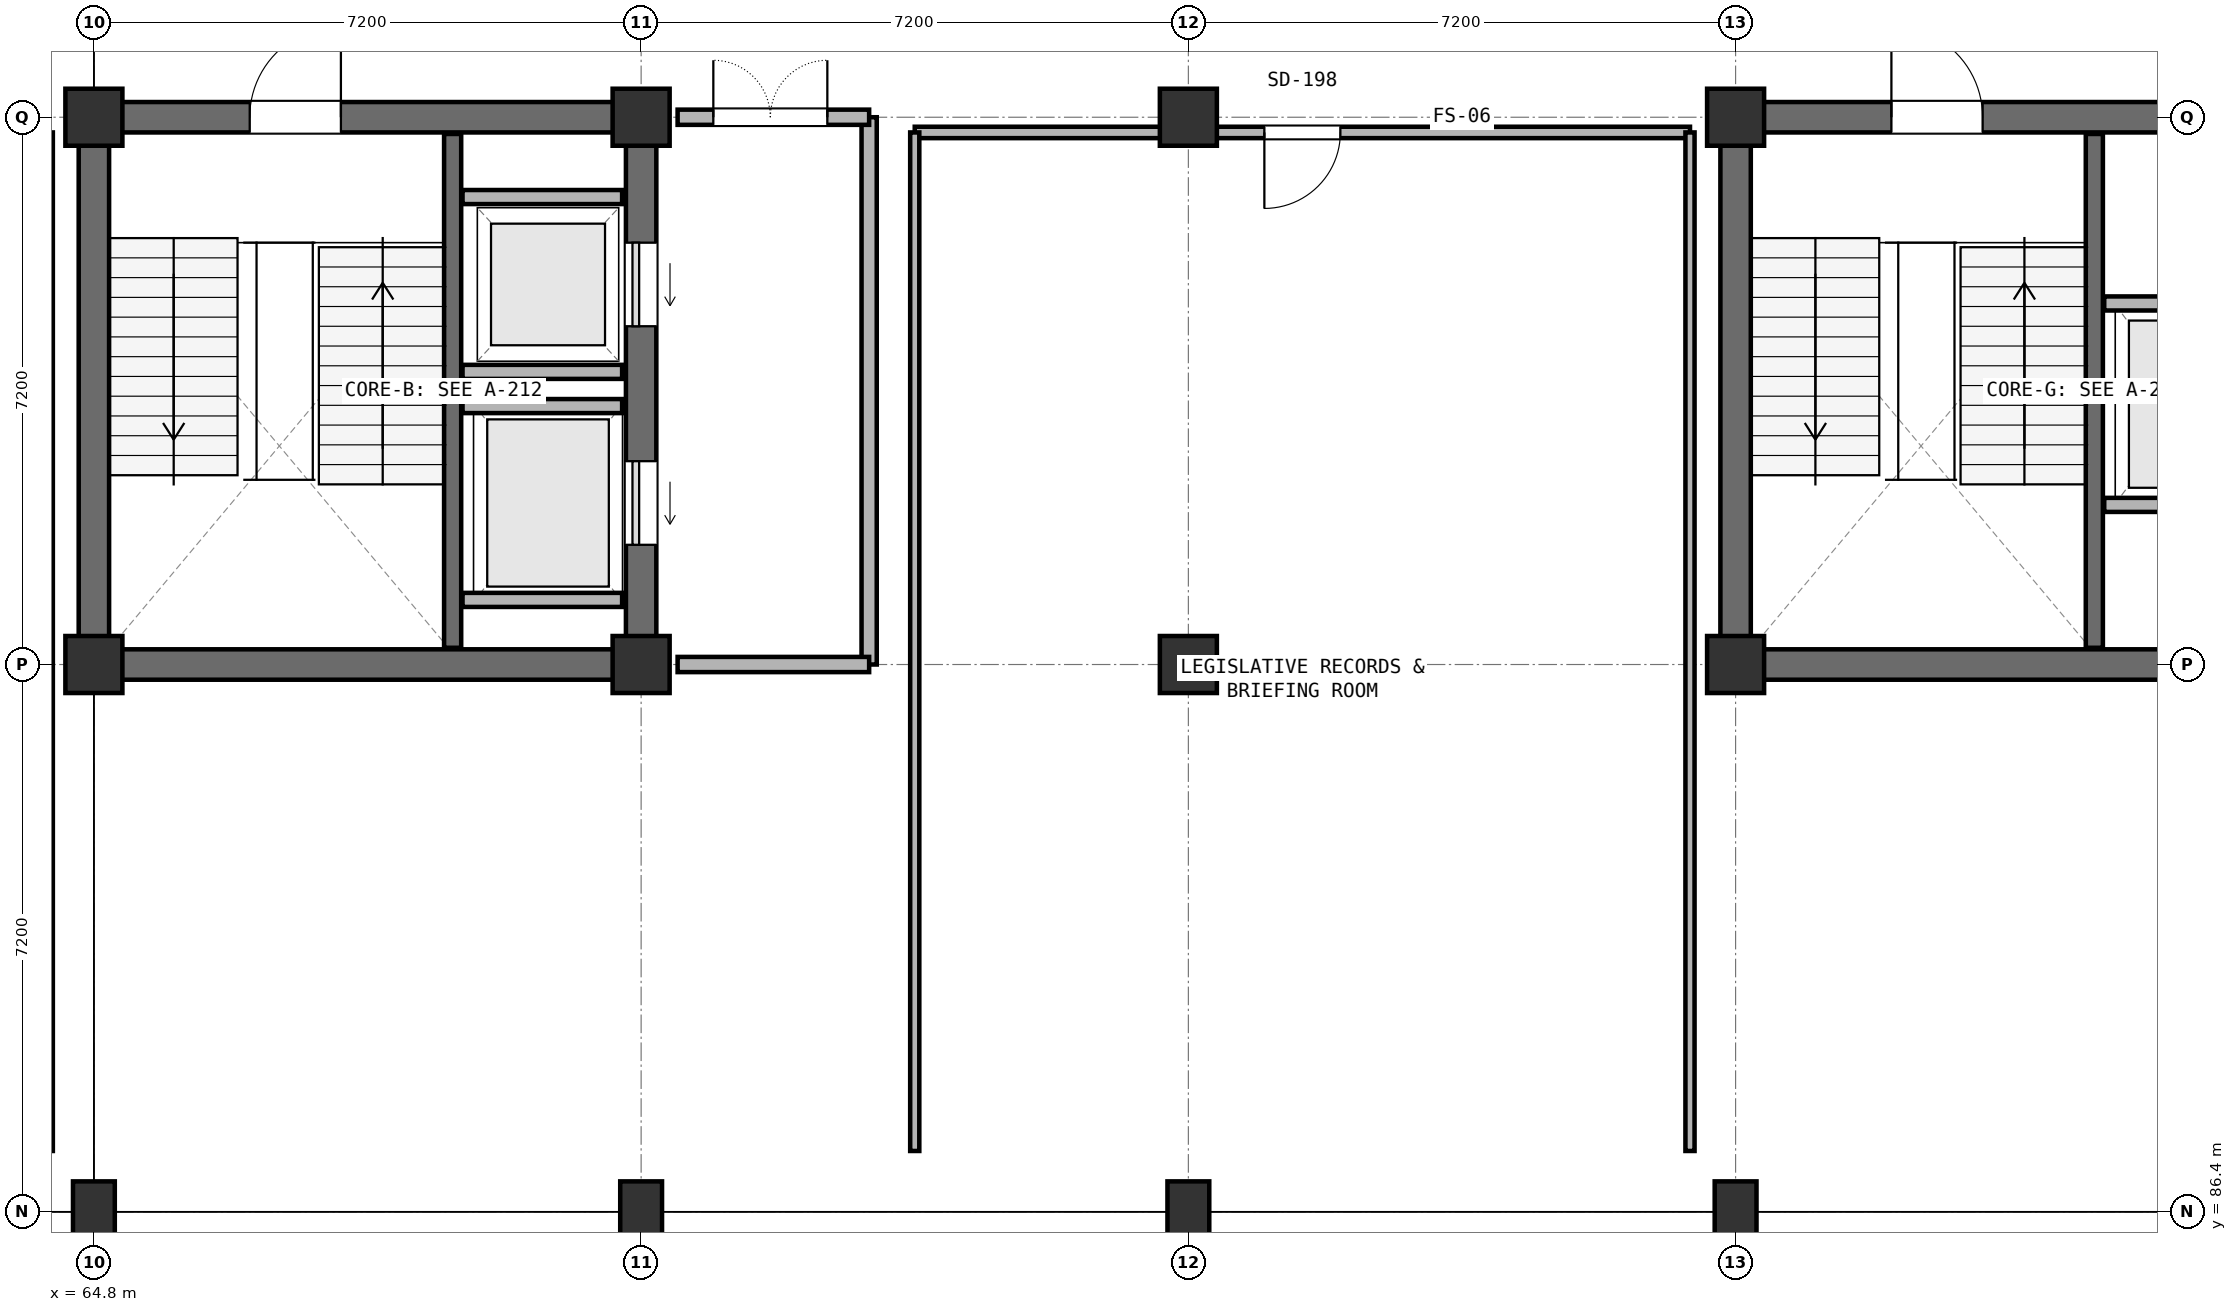
"""IFC4 building model, lengths in metres.
Left out: names, types, materials, properties, quantities, classifications, styles, units other than length and angle.
Written with IfcOpenShell. Run it as: python <this file> out.ifc"""

import sys

from ifc_helpers import new_model, si_unit, direction, frame, frame_2d, origin, origin_2d, place, context, subcontext, project, spatial, rectangle, extrude, element, fill, save


model = new_model("IFC4")
c1 = context("Model", 3, precision=1e-05, world=origin(), true_north=direction((0.0, 1.0)))
c2 = subcontext(c1, "Body", "Model", "MODEL_VIEW")
j1 = project(units=[si_unit("LENGTHUNIT", "METRE"), si_unit("PLANEANGLEUNIT", "RADIAN")], contexts=[c1])
p1 = place(None, origin())
s1 = spatial("IfcSite", under=j1, at=p1, CompositionType="ELEMENT")
p2 = place(p1, origin())
s2 = spatial("IfcBuilding", under=s1, at=p2, CompositionType="ELEMENT")
p3 = place(p2, frame((0.0, 0.0, 10.2)))
s3 = spatial("IfcBuildingStorey", under=s2, at=p3, CompositionType="ELEMENT", Elevation=10.2)
p4 = place(p3, frame((64.8, 86.4, 0.0), z_axis=(0.0, 0.0, 1.0), x_axis=(1.0, 0.0, 0.0)))
e1 = element("IfcColumn", 1, at=p4, inside=s3, PredefinedType="COLUMN", context=c2, shape_type="SweptSolid", body=[
    extrude(rectangle(XDim=0.55, YDim=0.8, at=origin_2d()), origin(), (0.0, 0.0, 1.0), 4.2),
])
for number, where, z_axis, x_axis in (
    (2, (64.8, 93.6, 0.0), (0.0, 0.0, 1.0), (1.0, 0.0, 0.0)),
    (3, (64.8, 100.8, 0.0), (0.0, 0.0, 1.0), (1.0, 0.0, 0.0)),
):
    element("IfcColumn", number, at=place(p3, frame(where, z_axis=z_axis, x_axis=x_axis)), inside=s3, PredefinedType="COLUMN", context=c2, shape_type="SweptSolid", body=[
        extrude(rectangle(XDim=0.75, YDim=0.75, at=origin_2d()), origin(), (0.0, 0.0, 1.0), 4.2),
    ])
p5 = place(p3, frame((72.0, 86.4, 0.0), z_axis=(0.0, 0.0, 1.0), x_axis=(1.0, 0.0, 0.0)))
e4 = element("IfcColumn", 4, at=p5, inside=s3, PredefinedType="COLUMN", context=c2, shape_type="SweptSolid", body=[
    extrude(rectangle(XDim=0.55, YDim=0.8, at=origin_2d()), origin(), (0.0, 0.0, 1.0), 4.2),
])
for number, where, z_axis, x_axis in (
    (5, (72.0, 93.6, 0.0), (0.0, 0.0, 1.0), (1.0, 0.0, 0.0)),
    (6, (72.0, 100.8, 0.0), (0.0, 0.0, 1.0), (1.0, 0.0, 0.0)),
):
    element("IfcColumn", number, at=place(p3, frame(where, z_axis=z_axis, x_axis=x_axis)), inside=s3, PredefinedType="COLUMN", context=c2, shape_type="SweptSolid", body=[
        extrude(rectangle(XDim=0.75, YDim=0.75, at=origin_2d()), origin(), (0.0, 0.0, 1.0), 4.2),
    ])
p6 = place(p3, frame((79.2, 86.4, 0.0), z_axis=(0.0, 0.0, 1.0), x_axis=(1.0, 0.0, 0.0)))
e7 = element("IfcColumn", 7, at=p6, inside=s3, PredefinedType="COLUMN", context=c2, shape_type="SweptSolid", body=[
    extrude(rectangle(XDim=0.55, YDim=0.8, at=origin_2d()), origin(), (0.0, 0.0, 1.0), 4.2),
])
for number, where, z_axis, x_axis in (
    (8, (79.2, 93.6, 0.0), (0.0, 0.0, 1.0), (1.0, 0.0, 0.0)),
    (9, (79.2, 100.8, 0.0), (0.0, 0.0, 1.0), (1.0, 0.0, 0.0)),
):
    element("IfcColumn", number, at=place(p3, frame(where, z_axis=z_axis, x_axis=x_axis)), inside=s3, PredefinedType="COLUMN", context=c2, shape_type="SweptSolid", body=[
        extrude(rectangle(XDim=0.75, YDim=0.75, at=origin_2d()), origin(), (0.0, 0.0, 1.0), 4.2),
    ])
p7 = place(p3, frame((86.4, 86.4, 0.0), z_axis=(0.0, 0.0, 1.0), x_axis=(1.0, 0.0, 0.0)))
e10 = element("IfcColumn", 10, at=p7, inside=s3, PredefinedType="COLUMN", context=c2, shape_type="SweptSolid", body=[
    extrude(rectangle(XDim=0.55, YDim=0.8, at=origin_2d()), origin(), (0.0, 0.0, 1.0), 4.2),
])
for number, where, z_axis, x_axis in (
    (11, (86.4, 93.6, 0.0), (0.0, 0.0, 1.0), (1.0, 0.0, 0.0)),
    (12, (86.4, 100.8, 0.0), (0.0, 0.0, 1.0), (1.0, 0.0, 0.0)),
):
    element("IfcColumn", number, at=place(p3, frame(where, z_axis=z_axis, x_axis=x_axis)), inside=s3, PredefinedType="COLUMN", context=c2, shape_type="SweptSolid", body=[
        extrude(rectangle(XDim=0.75, YDim=0.75, at=origin_2d()), origin(), (0.0, 0.0, 1.0), 4.2),
    ])
p8 = place(p3, frame((65.15, 93.6, 0.0), z_axis=(0.0, 0.0, 1.0), x_axis=(1.0, 0.0, 0.0)))
e13 = element("IfcWall", 13, at=p8, inside=s3, PredefinedType="SHEAR", context=c2, shape_type="SweptSolid", body=[
    extrude(rectangle(XDim=6.5, YDim=0.4, at=frame_2d((3.25, 0.0))), origin(), (0.0, 0.0, 1.0), 4.2),
])
p9 = place(p3, frame((72.0, 93.95, 0.0), z_axis=(0.0, 0.0, 1.0), x_axis=(0.0, 1.0, 0.0)))
e14 = element("IfcWall", 14, at=p9, inside=s3, PredefinedType="SHEAR", context=c2, shape_type="SweptSolid", body=[
    extrude(rectangle(XDim=6.5, YDim=0.4, at=frame_2d((3.25, 0.0))), origin(), (0.0, 0.0, 1.0), 4.2),
])
p10 = place(p9, frame((1.225, 0.0, 0.0)))
e15 = element("IfcOpeningElement", 15, at=p10, cuts=e14, PredefinedType="OPENING", context=c2, shape_type="SweptSolid", body=[
    extrude(rectangle(XDim=1.1, YDim=2.2, at=frame_2d((0.55, 1.1))), frame((0.0, 0.21, 0.0), z_axis=(0.0, -1.0, 0.0), x_axis=(1.0, 0.0, 0.0)), (0.0, 0.0, 1.0), 0.42),
])
p11 = place(p9, frame((4.1, 0.0, 0.0)))
e16 = element("IfcOpeningElement", 16, at=p11, cuts=e14, PredefinedType="OPENING", context=c2, shape_type="SweptSolid", body=[
    extrude(rectangle(XDim=1.1, YDim=2.2, at=frame_2d((0.55, 1.1))), frame((0.0, 0.21, 0.0), z_axis=(0.0, -1.0, 0.0), x_axis=(1.0, 0.0, 0.0)), (0.0, 0.0, 1.0), 0.42),
])
p12 = place(p3, frame((71.65, 100.8, 0.0), z_axis=(0.0, 0.0, 1.0), x_axis=(-1.0, 0.0, 0.0)))
e17 = element("IfcWall", 17, at=p12, inside=s3, PredefinedType="SHEAR", context=c2, shape_type="SweptSolid", body=[
    extrude(rectangle(XDim=6.5, YDim=0.4, at=frame_2d((3.25, 0.0))), origin(), (0.0, 0.0, 1.0), 4.2),
])
p13 = place(p12, frame((3.6, 0.0, 0.0)))
e18 = element("IfcOpeningElement", 18, at=p13, cuts=e17, PredefinedType="OPENING", context=c2, shape_type="SweptSolid", body=[
    extrude(rectangle(XDim=1.2, YDim=2.2, at=frame_2d((0.6, 1.1))), frame((0.0, 0.21, 0.0), z_axis=(0.0, -1.0, 0.0), x_axis=(1.0, 0.0, 0.0)), (0.0, 0.0, 1.0), 0.42),
])
p14 = place(p3, frame((64.8, 100.45, 0.0), z_axis=(0.0, 0.0, 1.0), x_axis=(0.0, -1.0, 0.0)))
e19 = element("IfcWall", 19, at=p14, inside=s3, PredefinedType="SHEAR", context=c2, shape_type="SweptSolid", body=[
    extrude(rectangle(XDim=6.5, YDim=0.4, at=frame_2d((3.25, 0.0))), origin(), (0.0, 0.0, 1.0), 4.2),
])
p15 = place(p3, frame((69.52, 93.82, 0.0), z_axis=(0.0, 0.0, 1.0), x_axis=(0.0, 1.0, 0.0)))
e20 = element("IfcWall", 20, at=p15, inside=s3, PredefinedType="SHEAR", context=c2, shape_type="SweptSolid", body=[
    extrude(rectangle(XDim=6.76, YDim=0.225, at=frame_2d((3.38, 0.0))), origin(), (0.0, 0.0, 1.0), 4.2),
])
p16 = place(p3, frame((86.75, 93.6, 0.0), z_axis=(0.0, 0.0, 1.0), x_axis=(1.0, 0.0, 0.0)))
e21 = element("IfcWall", 21, at=p16, inside=s3, PredefinedType="SHEAR", context=c2, shape_type="SweptSolid", body=[
    extrude(rectangle(XDim=6.5, YDim=0.4, at=frame_2d((3.25, 0.0))), origin(), (0.0, 0.0, 1.0), 4.2),
])
p17 = place(p3, frame((93.25, 100.8, 0.0), z_axis=(0.0, 0.0, 1.0), x_axis=(-1.0, 0.0, 0.0)))
e22 = element("IfcWall", 22, at=p17, inside=s3, PredefinedType="SHEAR", context=c2, shape_type="SweptSolid", body=[
    extrude(rectangle(XDim=6.5, YDim=0.4, at=frame_2d((3.25, 0.0))), origin(), (0.0, 0.0, 1.0), 4.2),
])
p18 = place(p17, frame((3.6, 0.0, 0.0)))
e23 = element("IfcOpeningElement", 23, at=p18, cuts=e22, PredefinedType="OPENING", context=c2, shape_type="SweptSolid", body=[
    extrude(rectangle(XDim=1.2, YDim=2.2, at=frame_2d((0.6, 1.1))), frame((0.0, 0.21, 0.0), z_axis=(0.0, -1.0, 0.0), x_axis=(1.0, 0.0, 0.0)), (0.0, 0.0, 1.0), 0.42),
])
p19 = place(p3, frame((86.4, 100.45, 0.0), z_axis=(0.0, 0.0, 1.0), x_axis=(0.0, -1.0, 0.0)))
e24 = element("IfcWall", 24, at=p19, inside=s3, PredefinedType="SHEAR", context=c2, shape_type="SweptSolid", body=[
    extrude(rectangle(XDim=6.5, YDim=0.4, at=frame_2d((3.25, 0.0))), origin(), (0.0, 0.0, 1.0), 4.2),
])
p20 = place(p3, frame((91.12, 93.82, 0.0), z_axis=(0.0, 0.0, 1.0), x_axis=(0.0, 1.0, 0.0)))
e25 = element("IfcWall", 25, at=p20, inside=s3, PredefinedType="SHEAR", context=c2, shape_type="SweptSolid", body=[
    extrude(rectangle(XDim=6.76, YDim=0.225, at=frame_2d((3.38, 0.0))), origin(), (0.0, 0.0, 1.0), 4.2),
])
for number, where, z_axis, x_axis in (
    (26, (69.65, 94.45, 0.0), (0.0, 0.0, 1.0), (1.0, 0.0, 0.0)),
    (27, (69.65, 97.0, 0.0), (0.0, 0.0, 1.0), (1.0, 0.0, 0.0)),
    (28, (69.65, 97.45, 0.0), (0.0, 0.0, 1.0), (1.0, 0.0, 0.0)),
    (29, (69.65, 99.75, 0.0), (0.0, 0.0, 1.0), (1.0, 0.0, 0.0)),
    (30, (91.25, 95.7, 0.0), (0.0, 0.0, 1.0), (1.0, 0.0, 0.0)),
    (31, (91.25, 98.35, 0.0), (0.0, 0.0, 1.0), (1.0, 0.0, 0.0)),
):
    element("IfcWall", number, at=place(p3, frame(where, z_axis=z_axis, x_axis=x_axis)), inside=s3, PredefinedType="PARTITIONING", context=c2, shape_type="SweptSolid", body=[
        extrude(rectangle(XDim=2.1, YDim=0.185, at=frame_2d((1.05, 0.0))), origin(), (0.0, 0.0, 1.0), 4.2),
    ])
p21 = place(p3, frame((75.0, 93.6, 0.0), z_axis=(0.0, 0.0, 1.0), x_axis=(0.0, 1.0, 0.0)))
e32 = element("IfcWall", 32, at=p21, inside=s3, PredefinedType="PARTITIONING", context=c2, shape_type="SweptSolid", body=[
    extrude(rectangle(XDim=7.2, YDim=0.2, at=frame_2d((3.6, 0.0))), origin(), (0.0, 0.0, 1.0), 3.08),
])
p22 = place(p3, frame((72.48, 93.6, 0.0), z_axis=(0.0, 0.0, 1.0), x_axis=(1.0, 0.0, 0.0)))
e33 = element("IfcWall", 33, at=p22, inside=s3, PredefinedType="PARTITIONING", context=c2, shape_type="SweptSolid", body=[
    extrude(rectangle(XDim=2.52, YDim=0.2, at=frame_2d((1.26, 0.0))), origin(), (0.0, 0.0, 1.0), 3.08),
])
p23 = place(p3, frame((75.0, 100.8, 0.0), z_axis=(0.0, 0.0, 1.0), x_axis=(-1.0, 0.0, 0.0)))
e34 = element("IfcWall", 34, at=p23, inside=s3, PredefinedType="PARTITIONING", context=c2, shape_type="SweptSolid", body=[
    extrude(rectangle(XDim=2.52, YDim=0.2, at=frame_2d((1.26, 0.0))), origin(), (0.0, 0.0, 1.0), 3.08),
])
p24 = place(p23, frame((0.55, 0.0, 0.0)))
e35 = element("IfcOpeningElement", 35, at=p24, cuts=e34, PredefinedType="OPENING", context=c2, shape_type="SweptSolid", body=[
    extrude(rectangle(XDim=1.5, YDim=2.2, at=frame_2d((0.75, 1.1))), frame((0.0, 0.11, 0.0), z_axis=(0.0, -1.0, 0.0), x_axis=(1.0, 0.0, 0.0)), (0.0, 0.0, 1.0), 0.22),
])
p25 = place(p3, frame((64.2, 100.6, 0.0), z_axis=(0.0, 0.0, 1.0), x_axis=(0.0, -1.0, 0.0)))
e36 = element("IfcWall", 36, at=p25, inside=s3, PredefinedType="PARTITIONING", context=c2, shape_type="SweptSolid", body=[
    extrude(rectangle(XDim=13.4, YDim=0.12, at=frame_2d((6.7, 0.0))), origin(), (0.0, 0.0, 1.0), 3.08),
])
p26 = place(p3, frame((85.8, 100.6, 0.0), z_axis=(0.0, 0.0, 1.0), x_axis=(-1.0, 0.0, 0.0)))
e37 = element("IfcWall", 37, at=p26, inside=s3, PredefinedType="PARTITIONING", context=c2, shape_type="SweptSolid", body=[
    extrude(rectangle(XDim=10.2, YDim=0.15, at=frame_2d((5.1, 0.0))), origin(), (0.0, 0.0, 1.0), 3.08),
])
p27 = place(p26, frame((4.6, 0.0, 0.0)))
e38 = element("IfcOpeningElement", 38, at=p27, cuts=e37, PredefinedType="OPENING", context=c2, shape_type="SweptSolid", body=[
    extrude(rectangle(XDim=1.0, YDim=2.15, at=frame_2d((0.5, 1.075))), frame((0.0, 0.085, 0.0), z_axis=(0.0, -1.0, 0.0), x_axis=(1.0, 0.0, 0.0)), (0.0, 0.0, 1.0), 0.17),
])
for number, where, z_axis, x_axis in (
    (39, (75.6, 87.2, 0.0), (0.0, 0.0, 1.0), (0.0, 1.0, 0.0)),
    (40, (85.8, 100.6, 0.0), (0.0, 0.0, 1.0), (0.0, -1.0, 0.0)),
):
    element("IfcWall", number, at=place(p3, frame(where, z_axis=z_axis, x_axis=x_axis)), inside=s3, PredefinedType="PARTITIONING", context=c2, shape_type="SweptSolid", body=[
        extrude(rectangle(XDim=13.4, YDim=0.12, at=frame_2d((6.7, 0.0))), origin(), (0.0, 0.0, 1.0), 3.08),
    ])
p28 = place(p10, origin())
e41 = element("IfcDoor", 41, at=p28, inside=s3, OperationType="SLIDING_TO_LEFT", PredefinedType="DOOR", context=c2, shape_type="SweptSolid", body=[
    extrude(rectangle(XDim=1.1, YDim=2.2, at=frame_2d((0.55, 1.1))), frame((0.0, 0.025, 0.0), z_axis=(0.0, -1.0, 0.0), x_axis=(1.0, 0.0, 0.0)), (0.0, 0.0, 1.0), 0.05),
])
fill(e15, e41)
p29 = place(p11, origin())
e42 = element("IfcDoor", 42, at=p29, inside=s3, OperationType="SLIDING_TO_LEFT", PredefinedType="DOOR", context=c2, shape_type="SweptSolid", body=[
    extrude(rectangle(XDim=1.1, YDim=2.2, at=frame_2d((0.55, 1.1))), frame((0.0, 0.025, 0.0), z_axis=(0.0, -1.0, 0.0), x_axis=(1.0, 0.0, 0.0)), (0.0, 0.0, 1.0), 0.05),
])
fill(e16, e42)
p30 = place(p13, frame((1.2, 0.0, 0.0), z_axis=(0.0, 0.0, 1.0), x_axis=(-1.0, 0.0, 0.0)))
e43 = element("IfcDoor", 43, at=p30, inside=s3, OperationType="SINGLE_SWING_RIGHT", PredefinedType="DOOR", context=c2, shape_type="SweptSolid", body=[
    extrude(rectangle(XDim=1.2, YDim=2.2, at=frame_2d((0.6, 1.1))), frame((0.0, 0.025, 0.0), z_axis=(0.0, -1.0, 0.0), x_axis=(1.0, 0.0, 0.0)), (0.0, 0.0, 1.0), 0.05),
])
fill(e18, e43)
p31 = place(p24, frame((1.5, 0.0, 0.0), z_axis=(0.0, 0.0, 1.0), x_axis=(-1.0, 0.0, 0.0)))
e44 = element("IfcDoor", 44, at=p31, inside=s3, OperationType="DOUBLE_DOOR_SINGLE_SWING", PredefinedType="DOOR", context=c2, shape_type="SweptSolid", body=[
    extrude(rectangle(XDim=1.5, YDim=2.2, at=frame_2d((0.75, 1.1))), frame((0.0, 0.025, 0.0), z_axis=(0.0, -1.0, 0.0), x_axis=(1.0, 0.0, 0.0)), (0.0, 0.0, 1.0), 0.05),
])
fill(e35, e44)
p32 = place(p18, frame((1.2, 0.0, 0.0), z_axis=(0.0, 0.0, 1.0), x_axis=(-1.0, 0.0, 0.0)))
e45 = element("IfcDoor", 45, at=p32, inside=s3, OperationType="SINGLE_SWING_LEFT", PredefinedType="DOOR", context=c2, shape_type="SweptSolid", body=[
    extrude(rectangle(XDim=1.2, YDim=2.2, at=frame_2d((0.6, 1.1))), frame((0.0, 0.025, 0.0), z_axis=(0.0, -1.0, 0.0), x_axis=(1.0, 0.0, 0.0)), (0.0, 0.0, 1.0), 0.05),
])
fill(e23, e45)
p33 = place(p27, origin())
e46 = element("IfcDoor", 46, at=p33, inside=s3, OperationType="SINGLE_SWING_RIGHT", PredefinedType="DOOR", context=c2, shape_type="SweptSolid", body=[
    extrude(rectangle(XDim=1.0, YDim=2.15, at=frame_2d((0.5, 1.075))), frame((0.0, 0.025, 0.0), z_axis=(0.0, -1.0, 0.0), x_axis=(1.0, 0.0, 0.0)), (0.0, 0.0, 1.0), 0.05),
])
fill(e38, e46)
save(model, sys.argv[1])
